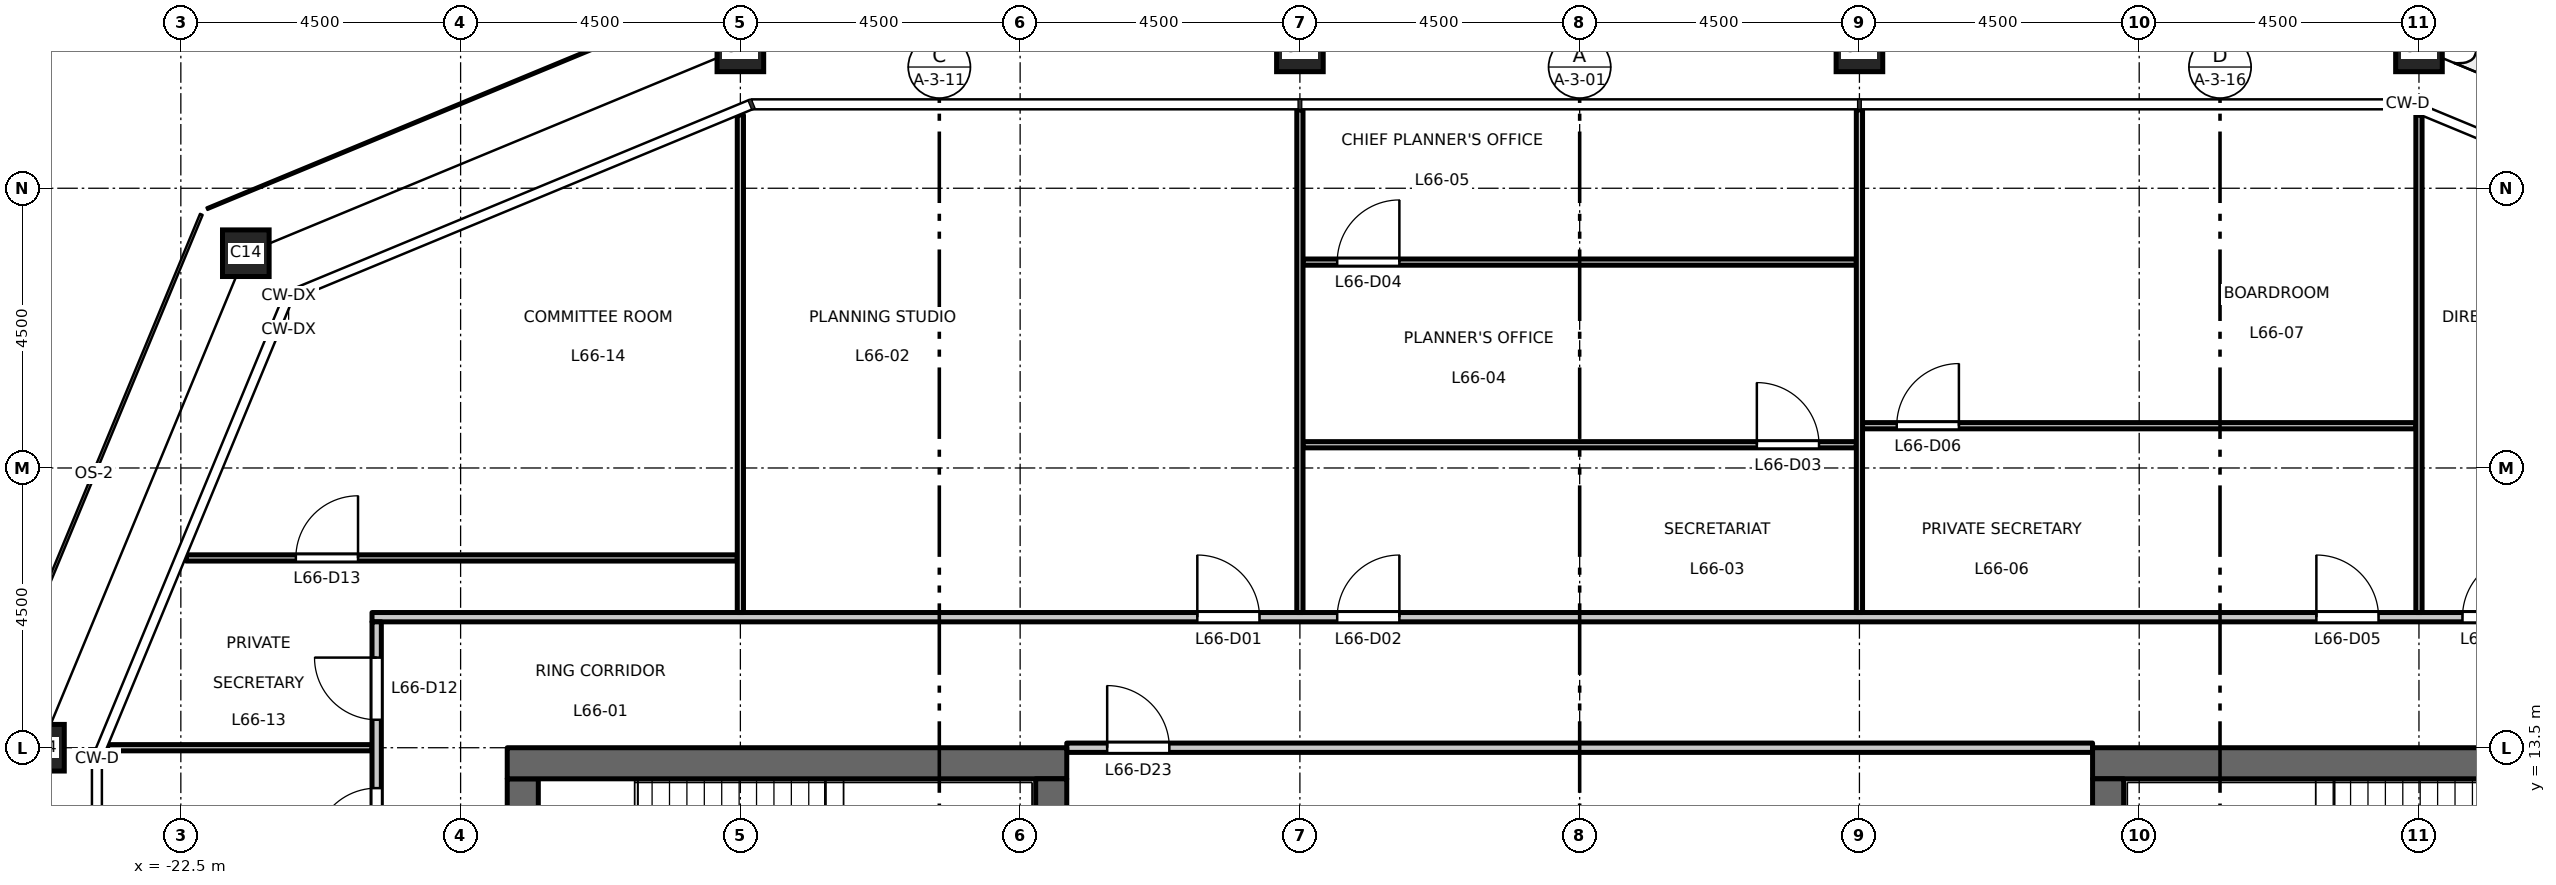
"""IFC4 building model, lengths in metres.
Left out: names, types, materials, properties, quantities, classifications, styles, units other than length and angle.
Written with IfcOpenShell. Run it as: python <this file> out.ifc"""

import sys

from ifc_helpers import new_model, si_unit, direction, frame, frame_2d, origin, origin_2d, place, context, subcontext, project, spatial, rectangle, hollow_rectangle, extrude, element, fill, save


model = new_model("IFC4")
c1 = context("Model", 3, precision=1e-05, world=origin(), true_north=direction((0.0, 1.0)))
c2 = subcontext(c1, "Body", "Model", "MODEL_VIEW")
j1 = project(units=[si_unit("LENGTHUNIT", "METRE"), si_unit("PLANEANGLEUNIT", "RADIAN")], contexts=[c1])
p1 = place(None, origin())
s1 = spatial("IfcSite", under=j1, at=p1, CompositionType="ELEMENT")
p2 = place(p1, origin())
s2 = spatial("IfcBuilding", under=s1, at=p2, CompositionType="ELEMENT")
p3 = place(p2, frame((0.0, 0.0, 307.7)))
s3 = spatial("IfcBuildingStorey", under=s2, at=p3, CompositionType="ELEMENT", Elevation=307.7)
for number, where, z_axis, x_axis in (
    (1, (13.5, 24.75, 0.0), (0.0, 0.0, 1.0), (1.0, 0.0, 0.0)),
    (2, (4.5, 24.75, 0.0), (0.0, 0.0, 1.0), (1.0, 0.0, 0.0)),
    (3, (-4.5, 24.75, 0.0), (0.0, 0.0, 1.0), (1.0, 0.0, 0.0)),
    (4, (-13.5, 24.75, 0.0), (0.0, 0.0, 1.0), (1.0, 0.0, 0.0)),
    (5, (-21.455, 21.455, 0.0), (0.0, 0.0, 1.0), (1.0, 0.0, 0.0)),
    (6, (-24.75, 13.5, 0.0), (0.0, 0.0, 1.0), (1.0, 0.0, 0.0)),
):
    element("IfcColumn", number, at=place(p3, frame(where, z_axis=z_axis, x_axis=x_axis)), inside=s3, PredefinedType="COLUMN", context=c2, shape_type="SweptSolid", body=[
        extrude(hollow_rectangle(XDim=0.75, YDim=0.75, WallThickness=0.04, at=origin_2d()), origin(), (0.0, 0.0, 1.0), 4.5),
    ])
p4 = place(p3, frame((-17.0, -13.0, 0.0), z_axis=(0.0, 0.0, 1.0), x_axis=(0.0, 1.0, 0.0)))
e7 = element("IfcWall", 7, at=p4, inside=s3, PredefinedType="SHEAR", context=c2, shape_type="SweptSolid", body=[
    extrude(rectangle(XDim=26.0, YDim=0.5, at=frame_2d((13.0, 0.0))), origin(), (0.0, 0.0, 1.0), 4.35),
])
p5 = place(p4, frame((16.825, 0.0, 0.0)))
e8 = element("IfcOpeningElement", 8, at=p5, cuts=e7, PredefinedType="OPENING", context=c2, shape_type="SweptSolid", body=[
    extrude(rectangle(XDim=1.8, YDim=2.1, at=frame_2d((0.9, 1.05))), frame((0.0, 0.26, 0.0), z_axis=(0.0, -1.0, 0.0), x_axis=(1.0, 0.0, 0.0)), (0.0, 0.0, 1.0), 0.52),
])
p6 = place(p4, frame((7.375, 0.0, 0.0)))
e9 = element("IfcOpeningElement", 9, at=p6, cuts=e7, PredefinedType="OPENING", context=c2, shape_type="SweptSolid", body=[
    extrude(rectangle(XDim=1.8, YDim=2.1, at=frame_2d((0.9, 1.05))), frame((0.0, 0.26, 0.0), z_axis=(0.0, -1.0, 0.0), x_axis=(1.0, 0.0, 0.0)), (0.0, 0.0, 1.0), 0.52),
])
p7 = place(p3, frame((-8.25, 13.25, 0.0), z_axis=(0.0, 0.0, 1.0), x_axis=(-1.0, 0.0, 0.0)))
e10 = element("IfcWall", 10, at=p7, inside=s3, PredefinedType="SHEAR", context=c2, shape_type="SweptSolid", body=[
    extrude(rectangle(XDim=9.0, YDim=0.5, at=frame_2d((4.5, 0.0))), origin(), (0.0, 0.0, 1.0), 4.35),
])
p8 = place(p3, frame((-8.5, -13.0, 0.0), z_axis=(0.0, 0.0, 1.0), x_axis=(0.0, 1.0, 0.0)))
e11 = element("IfcWall", 11, at=p8, inside=s3, PredefinedType="SHEAR", context=c2, shape_type="SweptSolid", body=[
    extrude(rectangle(XDim=26.0, YDim=0.5, at=frame_2d((13.0, 0.0))), origin(), (0.0, 0.0, 1.0), 4.35),
])
p9 = place(p3, frame((8.25, 13.25, 0.0), z_axis=(0.0, 0.0, 1.0), x_axis=(1.0, 0.0, 0.0)))
e12 = element("IfcWall", 12, at=p9, inside=s3, PredefinedType="SHEAR", context=c2, shape_type="SweptSolid", body=[
    extrude(rectangle(XDim=9.0, YDim=0.5, at=frame_2d((4.5, 0.0))), origin(), (0.0, 0.0, 1.0), 4.35),
])
p10 = place(p3, frame((8.5, -13.0, 0.0), z_axis=(0.0, 0.0, 1.0), x_axis=(0.0, 1.0, 0.0)))
e13 = element("IfcWall", 13, at=p10, inside=s3, PredefinedType="SHEAR", context=c2, shape_type="SweptSolid", body=[
    extrude(rectangle(XDim=26.0, YDim=0.5, at=frame_2d((13.0, 0.0))), origin(), (0.0, 0.0, 1.0), 4.35),
])
p11 = place(p3, frame((-23.678, 13.5, 0.0), z_axis=(0.0, 0.0, 1.0), x_axis=(1.0, 0.0, 0.0)))
e14 = element("IfcWall", 14, at=p11, inside=s3, PredefinedType="PARTITIONING", context=c2, shape_type="SweptSolid", body=[
    extrude(rectangle(XDim=4.253, YDim=0.1, at=frame_2d((2.126, 0.0))), origin(), (0.0, 0.0, 1.0), 4.35),
])
p12 = place(p3, frame((-8.25, 13.5, 0.0), z_axis=(0.0, 0.0, 1.0), x_axis=(1.0, 0.0, 0.0)))
e15 = element("IfcWall", 15, at=p12, inside=s3, PredefinedType="PARTITIONING", context=c2, shape_type="SweptSolid", body=[
    extrude(rectangle(XDim=16.5, YDim=0.15, at=frame_2d((8.25, 0.0))), origin(), (0.0, 0.0, 1.0), 4.35),
])
p13 = place(p12, frame((0.65, 0.0, 0.0)))
e16 = element("IfcOpeningElement", 16, at=p13, cuts=e15, PredefinedType="OPENING", context=c2, shape_type="SweptSolid", body=[
    extrude(rectangle(XDim=1.0, YDim=2.1, at=frame_2d((0.5, 1.05))), frame((0.0, 0.085, 0.0), z_axis=(0.0, -1.0, 0.0), x_axis=(1.0, 0.0, 0.0)), (0.0, 0.0, 1.0), 0.17),
])
p14 = place(p3, frame((-19.425, 15.6, 0.0), z_axis=(0.0, 0.0, 1.0), x_axis=(1.0, 0.0, 0.0)))
e17 = element("IfcWall", 17, at=p14, inside=s3, PredefinedType="PARTITIONING", context=c2, shape_type="SweptSolid", body=[
    extrude(rectangle(XDim=38.85, YDim=0.15, at=frame_2d((19.425, 0.0))), origin(), (0.0, 0.0, 1.0), 4.35),
])
p15 = place(p14, frame((13.275, 0.0, 0.0)))
e18 = element("IfcOpeningElement", 18, at=p15, cuts=e17, PredefinedType="OPENING", context=c2, shape_type="SweptSolid", body=[
    extrude(rectangle(XDim=1.0, YDim=2.1, at=frame_2d((0.5, 1.05))), frame((0.0, 0.085, 0.0), z_axis=(0.0, -1.0, 0.0), x_axis=(1.0, 0.0, 0.0)), (0.0, 0.0, 1.0), 0.17),
])
p16 = place(p14, frame((15.525, 0.0, 0.0)))
e19 = element("IfcOpeningElement", 19, at=p16, cuts=e17, PredefinedType="OPENING", context=c2, shape_type="SweptSolid", body=[
    extrude(rectangle(XDim=1.0, YDim=2.1, at=frame_2d((0.5, 1.05))), frame((0.0, 0.085, 0.0), z_axis=(0.0, -1.0, 0.0), x_axis=(1.0, 0.0, 0.0)), (0.0, 0.0, 1.0), 0.17),
])
p17 = place(p14, frame((31.275, 0.0, 0.0)))
e20 = element("IfcOpeningElement", 20, at=p17, cuts=e17, PredefinedType="OPENING", context=c2, shape_type="SweptSolid", body=[
    extrude(rectangle(XDim=1.0, YDim=2.1, at=frame_2d((0.5, 1.05))), frame((0.0, 0.085, 0.0), z_axis=(0.0, -1.0, 0.0), x_axis=(1.0, 0.0, 0.0)), (0.0, 0.0, 1.0), 0.17),
])
p18 = place(p14, frame((33.625, 0.0, 0.0)))
e21 = element("IfcOpeningElement", 21, at=p18, cuts=e17, PredefinedType="OPENING", context=c2, shape_type="SweptSolid", body=[
    extrude(rectangle(XDim=1.0, YDim=2.1, at=frame_2d((0.5, 1.05))), frame((0.0, 0.085, 0.0), z_axis=(0.0, -1.0, 0.0), x_axis=(1.0, 0.0, 0.0)), (0.0, 0.0, 1.0), 0.17),
])
p19 = place(p3, frame((-22.413, 16.553, 0.0), z_axis=(0.0, 0.0, 1.0), x_axis=(1.0, 0.0, 0.0)))
e22 = element("IfcWall", 22, at=p19, inside=s3, PredefinedType="PARTITIONING", context=c2, shape_type="SweptSolid", body=[
    extrude(rectangle(XDim=8.863, YDim=0.1, at=frame_2d((4.432, 0.0))), origin(), (0.0, 0.0, 1.0), 4.35),
])
p20 = place(p19, frame((1.763, 0.0, 0.0)))
e23 = element("IfcOpeningElement", 23, at=p20, cuts=e22, PredefinedType="OPENING", context=c2, shape_type="SweptSolid", body=[
    extrude(rectangle(XDim=1.0, YDim=2.1, at=frame_2d((0.5, 1.05))), frame((0.0, 0.06, 0.0), z_axis=(0.0, -1.0, 0.0), x_axis=(1.0, 0.0, 0.0)), (0.0, 0.0, 1.0), 0.12),
])
p21 = place(p3, frame((-4.45, 18.374, 0.0), z_axis=(0.0, 0.0, 1.0), x_axis=(1.0, 0.0, 0.0)))
e24 = element("IfcWall", 24, at=p21, inside=s3, PredefinedType="PARTITIONING", context=c2, shape_type="SweptSolid", body=[
    extrude(rectangle(XDim=8.9, YDim=0.1, at=frame_2d((4.45, 0.0))), origin(), (0.0, 0.0, 1.0), 4.35),
])
p22 = place(p21, frame((7.3, 0.0, 0.0)))
e25 = element("IfcOpeningElement", 25, at=p22, cuts=e24, PredefinedType="OPENING", context=c2, shape_type="SweptSolid", body=[
    extrude(rectangle(XDim=1.0, YDim=2.1, at=frame_2d((0.5, 1.05))), frame((0.0, 0.06, 0.0), z_axis=(0.0, -1.0, 0.0), x_axis=(1.0, 0.0, 0.0)), (0.0, 0.0, 1.0), 0.12),
])
p23 = place(p3, frame((4.55, 18.68, 0.0), z_axis=(0.0, 0.0, 1.0), x_axis=(1.0, 0.0, 0.0)))
e26 = element("IfcWall", 26, at=p23, inside=s3, PredefinedType="PARTITIONING", context=c2, shape_type="SweptSolid", body=[
    extrude(rectangle(XDim=8.9, YDim=0.1, at=frame_2d((4.45, 0.0))), origin(), (0.0, 0.0, 1.0), 4.35),
])
p24 = place(p23, frame((0.55, 0.0, 0.0)))
e27 = element("IfcOpeningElement", 27, at=p24, cuts=e26, PredefinedType="OPENING", context=c2, shape_type="SweptSolid", body=[
    extrude(rectangle(XDim=1.0, YDim=2.1, at=frame_2d((0.5, 1.05))), frame((0.0, 0.06, 0.0), z_axis=(0.0, -1.0, 0.0), x_axis=(1.0, 0.0, 0.0)), (0.0, 0.0, 1.0), 0.12),
])
p25 = place(p3, frame((-4.45, 21.312, 0.0), z_axis=(0.0, 0.0, 1.0), x_axis=(1.0, 0.0, 0.0)))
e28 = element("IfcWall", 28, at=p25, inside=s3, PredefinedType="PARTITIONING", context=c2, shape_type="SweptSolid", body=[
    extrude(rectangle(XDim=8.9, YDim=0.1, at=frame_2d((4.45, 0.0))), origin(), (0.0, 0.0, 1.0), 4.35),
])
p26 = place(p25, frame((0.55, 0.0, 0.0)))
e29 = element("IfcOpeningElement", 29, at=p26, cuts=e28, PredefinedType="OPENING", context=c2, shape_type="SweptSolid", body=[
    extrude(rectangle(XDim=1.0, YDim=2.1, at=frame_2d((0.5, 1.05))), frame((0.0, 0.06, 0.0), z_axis=(0.0, -1.0, 0.0), x_axis=(1.0, 0.0, 0.0)), (0.0, 0.0, 1.0), 0.12),
])
p27 = place(p3, frame((-19.35, -15.525, 0.0), z_axis=(0.0, 0.0, 1.0), x_axis=(0.0, 1.0, 0.0)))
e30 = element("IfcWall", 30, at=p27, inside=s3, PredefinedType="PARTITIONING", context=c2, shape_type="SweptSolid", body=[
    extrude(rectangle(XDim=31.05, YDim=0.15, at=frame_2d((15.525, 0.0))), origin(), (0.0, 0.0, 1.0), 4.35),
])
p28 = place(p27, frame((29.475, 0.0, 0.0)))
e31 = element("IfcOpeningElement", 31, at=p28, cuts=e30, PredefinedType="OPENING", context=c2, shape_type="SweptSolid", body=[
    extrude(rectangle(XDim=1.0, YDim=2.1, at=frame_2d((0.5, 1.05))), frame((0.0, 0.085, 0.0), z_axis=(0.0, -1.0, 0.0), x_axis=(1.0, 0.0, 0.0)), (0.0, 0.0, 1.0), 0.17),
])
p29 = place(p27, frame((9.375, 0.0, 0.0)))
e32 = element("IfcOpeningElement", 32, at=p29, cuts=e30, PredefinedType="OPENING", context=c2, shape_type="SweptSolid", body=[
    extrude(rectangle(XDim=1.0, YDim=2.1, at=frame_2d((0.5, 1.05))), frame((0.0, 0.085, 0.0), z_axis=(0.0, -1.0, 0.0), x_axis=(1.0, 0.0, 0.0)), (0.0, 0.0, 1.0), 0.17),
])
p30 = place(p27, frame((11.625, 0.0, 0.0)))
e33 = element("IfcOpeningElement", 33, at=p30, cuts=e30, PredefinedType="OPENING", context=c2, shape_type="SweptSolid", body=[
    extrude(rectangle(XDim=1.0, YDim=2.1, at=frame_2d((0.5, 1.05))), frame((0.0, 0.085, 0.0), z_axis=(0.0, -1.0, 0.0), x_axis=(1.0, 0.0, 0.0)), (0.0, 0.0, 1.0), 0.17),
])
p31 = place(p27, frame((27.375, 0.0, 0.0)))
e34 = element("IfcOpeningElement", 34, at=p31, cuts=e30, PredefinedType="OPENING", context=c2, shape_type="SweptSolid", body=[
    extrude(rectangle(XDim=1.0, YDim=2.1, at=frame_2d((0.5, 1.05))), frame((0.0, 0.085, 0.0), z_axis=(0.0, -1.0, 0.0), x_axis=(1.0, 0.0, 0.0)), (0.0, 0.0, 1.0), 0.17),
])
p32 = place(p3, frame((-13.5, 15.675, 0.0), z_axis=(0.0, 0.0, 1.0), x_axis=(0.0, 1.0, 0.0)))
e35 = element("IfcWall", 35, at=p32, inside=s3, PredefinedType="PARTITIONING", context=c2, shape_type="SweptSolid", body=[
    extrude(rectangle(XDim=8.003, YDim=0.1, at=frame_2d((4.001, 0.0))), origin(), (0.0, 0.0, 1.0), 3.75),
])
for number, where, z_axis, x_axis in (
    (36, (-4.5, 15.675, 0.0), (0.0, 0.0, 1.0), (0.0, 1.0, 0.0)),
    (37, (4.5, 15.675, 0.0), (0.0, 0.0, 1.0), (0.0, 1.0, 0.0)),
):
    element("IfcWall", number, at=place(p3, frame(where, z_axis=z_axis, x_axis=x_axis)), inside=s3, PredefinedType="PARTITIONING", context=c2, shape_type="SweptSolid", body=[
        extrude(rectangle(XDim=8.085, YDim=0.1, at=frame_2d((4.042, 0.0))), origin(), (0.0, 0.0, 1.0), 3.65),
    ])
p33 = place(p3, frame((13.5, 15.675, 0.0), z_axis=(0.0, 0.0, 1.0), x_axis=(0.0, 1.0, 0.0)))
e38 = element("IfcWall", 38, at=p33, inside=s3, PredefinedType="PARTITIONING", context=c2, shape_type="SweptSolid", body=[
    extrude(rectangle(XDim=8.003, YDim=0.1, at=frame_2d((4.001, 0.0))), origin(), (0.0, 0.0, 1.0), 3.75),
])
p34 = place(p15, origin())
e39 = element("IfcDoor", 39, at=p34, inside=s3, OperationType="SINGLE_SWING_LEFT", PredefinedType="DOOR", context=c2, shape_type="SweptSolid", body=[
    extrude(rectangle(XDim=1.0, YDim=2.1, at=frame_2d((0.5, 1.05))), frame((0.0, 0.025, 0.0), z_axis=(0.0, -1.0, 0.0), x_axis=(1.0, 0.0, 0.0)), (0.0, 0.0, 1.0), 0.05),
])
fill(e18, e39)
p35 = place(p16, origin())
e40 = element("IfcDoor", 40, at=p35, inside=s3, OperationType="SINGLE_SWING_RIGHT", PredefinedType="DOOR", context=c2, shape_type="SweptSolid", body=[
    extrude(rectangle(XDim=1.0, YDim=2.1, at=frame_2d((0.5, 1.05))), frame((0.0, 0.025, 0.0), z_axis=(0.0, -1.0, 0.0), x_axis=(1.0, 0.0, 0.0)), (0.0, 0.0, 1.0), 0.05),
])
fill(e19, e40)
p36 = place(p22, origin())
e41 = element("IfcDoor", 41, at=p36, inside=s3, OperationType="SINGLE_SWING_LEFT", PredefinedType="DOOR", context=c2, shape_type="SweptSolid", body=[
    extrude(rectangle(XDim=1.0, YDim=2.1, at=frame_2d((0.5, 1.05))), frame((0.0, 0.025, 0.0), z_axis=(0.0, -1.0, 0.0), x_axis=(1.0, 0.0, 0.0)), (0.0, 0.0, 1.0), 0.05),
])
fill(e25, e41)
p37 = place(p26, origin())
e42 = element("IfcDoor", 42, at=p37, inside=s3, OperationType="SINGLE_SWING_RIGHT", PredefinedType="DOOR", context=c2, shape_type="SweptSolid", body=[
    extrude(rectangle(XDim=1.0, YDim=2.1, at=frame_2d((0.5, 1.05))), frame((0.0, 0.025, 0.0), z_axis=(0.0, -1.0, 0.0), x_axis=(1.0, 0.0, 0.0)), (0.0, 0.0, 1.0), 0.05),
])
fill(e29, e42)
p38 = place(p17, origin())
e43 = element("IfcDoor", 43, at=p38, inside=s3, OperationType="SINGLE_SWING_LEFT", PredefinedType="DOOR", context=c2, shape_type="SweptSolid", body=[
    extrude(rectangle(XDim=1.0, YDim=2.1, at=frame_2d((0.5, 1.05))), frame((0.0, 0.025, 0.0), z_axis=(0.0, -1.0, 0.0), x_axis=(1.0, 0.0, 0.0)), (0.0, 0.0, 1.0), 0.05),
])
fill(e20, e43)
p39 = place(p24, origin())
e44 = element("IfcDoor", 44, at=p39, inside=s3, OperationType="SINGLE_SWING_RIGHT", PredefinedType="DOOR", context=c2, shape_type="SweptSolid", body=[
    extrude(rectangle(XDim=1.0, YDim=2.1, at=frame_2d((0.5, 1.05))), frame((0.0, 0.025, 0.0), z_axis=(0.0, -1.0, 0.0), x_axis=(1.0, 0.0, 0.0)), (0.0, 0.0, 1.0), 0.05),
])
fill(e27, e44)
p40 = place(p28, origin())
e45 = element("IfcDoor", 45, at=p40, inside=s3, OperationType="SINGLE_SWING_RIGHT", PredefinedType="DOOR", context=c2, shape_type="SweptSolid", body=[
    extrude(rectangle(XDim=1.0, YDim=2.1, at=frame_2d((0.5, 1.05))), frame((0.0, 0.025, 0.0), z_axis=(0.0, -1.0, 0.0), x_axis=(1.0, 0.0, 0.0)), (0.0, 0.0, 1.0), 0.05),
])
fill(e31, e45)
p41 = place(p20, origin())
e46 = element("IfcDoor", 46, at=p41, inside=s3, OperationType="SINGLE_SWING_RIGHT", PredefinedType="DOOR", context=c2, shape_type="SweptSolid", body=[
    extrude(rectangle(XDim=1.0, YDim=2.1, at=frame_2d((0.5, 1.05))), frame((0.0, 0.025, 0.0), z_axis=(0.0, -1.0, 0.0), x_axis=(1.0, 0.0, 0.0)), (0.0, 0.0, 1.0), 0.05),
])
fill(e23, e46)
p42 = place(p18, origin())
e47 = element("IfcDoor", 47, at=p42, inside=s3, OperationType="SINGLE_SWING_RIGHT", PredefinedType="DOOR", context=c2, shape_type="SweptSolid", body=[
    extrude(rectangle(XDim=1.0, YDim=2.1, at=frame_2d((0.5, 1.05))), frame((0.0, 0.025, 0.0), z_axis=(0.0, -1.0, 0.0), x_axis=(1.0, 0.0, 0.0)), (0.0, 0.0, 1.0), 0.05),
])
fill(e21, e47)
p43 = place(p31, origin())
e48 = element("IfcDoor", 48, at=p43, inside=s3, OperationType="SINGLE_SWING_LEFT", PredefinedType="DOOR", context=c2, shape_type="SweptSolid", body=[
    extrude(rectangle(XDim=1.0, YDim=2.1, at=frame_2d((0.5, 1.05))), frame((0.0, 0.025, 0.0), z_axis=(0.0, -1.0, 0.0), x_axis=(1.0, 0.0, 0.0)), (0.0, 0.0, 1.0), 0.05),
])
fill(e34, e48)
p44 = place(p13, origin())
e49 = element("IfcDoor", 49, at=p44, inside=s3, OperationType="SINGLE_SWING_LEFT", PredefinedType="DOOR", context=c2, shape_type="SweptSolid", body=[
    extrude(rectangle(XDim=1.0, YDim=2.1, at=frame_2d((0.5, 1.05))), frame((0.0, 0.025, 0.0), z_axis=(0.0, -1.0, 0.0), x_axis=(1.0, 0.0, 0.0)), (0.0, 0.0, 1.0), 0.05),
])
fill(e16, e49)
save(model, sys.argv[1])
